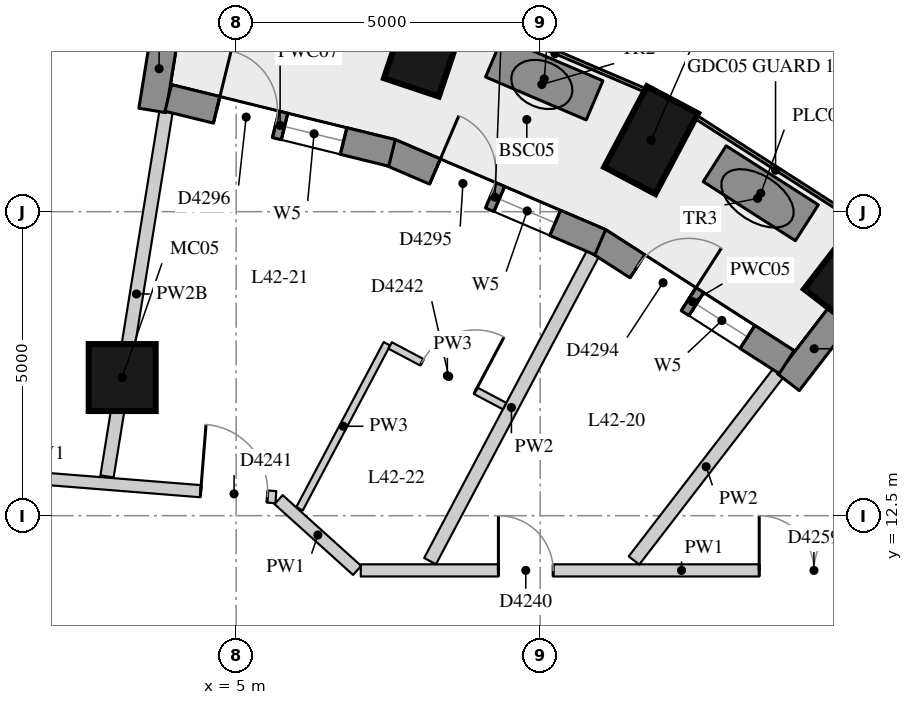
"""IFC4 building model, lengths in metres.
Left out: names, types, materials, properties, quantities, classifications, styles, units other than length and angle.
Written with IfcOpenShell. Run it as: python <this file> out.ifc"""

import sys

from ifc_helpers import new_model, si_unit, direction, frame, frame_2d, origin, origin_2d, place, context, subcontext, project, spatial, rectangle, extrude, element, fill, save


model = new_model("IFC4")
c1 = context("Model", 3, precision=1e-05, world=origin(), true_north=direction((0.0, 1.0)))
c2 = subcontext(c1, "Body", "Model", "MODEL_VIEW")
j1 = project(units=[si_unit("LENGTHUNIT", "METRE"), si_unit("PLANEANGLEUNIT", "RADIAN")], contexts=[c1])
p1 = place(None, origin())
s1 = spatial("IfcSite", under=j1, at=p1, CompositionType="ELEMENT")
p2 = place(p1, origin())
s2 = spatial("IfcBuilding", under=s1, at=p2, CompositionType="ELEMENT")
p3 = place(p2, frame((0.0, 0.0, 151.7)))
s3 = spatial("IfcBuildingStorey", under=s2, at=p3, CompositionType="ELEMENT", Elevation=151.7)
for number, where, z_axis, x_axis in (
    (1, (15.173, 16.532, 0.0), (0.0, 0.0, 1.0), (0.61, 0.792, 0.0)),
    (2, (11.825, 18.676, 0.0), (0.0, 0.0, 1.0), (0.468, 0.884, 0.0)),
    (3, (8.12, 20.256, 0.0), (0.0, 0.0, 1.0), (0.317, 0.949, 0.0)),
):
    element("IfcColumn", number, at=place(p3, frame(where, z_axis=z_axis, x_axis=x_axis)), inside=s3, PredefinedType="COLUMN", context=c2, shape_type="SweptSolid", body=[
        extrude(rectangle(XDim=1.5, YDim=0.95, at=origin_2d()), origin(), (0.0, 0.0, 1.0), 3.3),
    ])
p4 = place(p3, frame((3.126, 14.772, 0.0), z_axis=(0.0, 0.0, 1.0), x_axis=(1.0, 0.0, 0.0)))
e4 = element("IfcColumn", 4, at=p4, inside=s3, PredefinedType="COLUMN", context=c2, shape_type="SweptSolid", body=[
    extrude(rectangle(XDim=1.1, YDim=1.1, at=origin_2d()), origin(), (0.0, 0.0, 1.0), 3.3),
])
p5 = place(p3, frame((14.931, 15.797, 0.0), z_axis=(0.0, 0.0, 1.0), x_axis=(-0.609897399413, -0.792480385996, 0.0)))
e5 = element("IfcWall", 5, at=p5, inside=s3, PredefinedType="SOLIDWALL", context=c2, shape_type="SweptSolid", body=[
    extrude(rectangle(XDim=1.391, YDim=0.45, at=frame_2d((0.695, 0.0))), origin(), (0.0, 0.0, 1.0), 3.02),
])
p6 = place(p3, frame((3.844, 20.538, 0.0), z_axis=(0.0, 0.0, 1.0), x_axis=(-0.159641024018, -0.98717513312, 0.0)))
e6 = element("IfcWall", 6, at=p6, inside=s3, PredefinedType="SOLIDWALL", context=c2, shape_type="SweptSolid", body=[
    extrude(rectangle(XDim=1.39, YDim=0.45, at=frame_2d((0.695, 0.0))), origin(), (0.0, 0.0, 1.0), 2.57),
])
p7 = place(p3, frame((14.054, 15.025, 0.0), z_axis=(0.0, 0.0, 1.0), x_axis=(-0.841393801846, 0.54042249233, 0.0)))
e7 = element("IfcWall", 7, at=p7, inside=s3, PredefinedType="SOLIDWALL", context=c2, shape_type="SweptSolid", body=[
    extrude(rectangle(XDim=3.683, YDim=0.45, at=frame_2d((1.841, 0.0))), origin(), (0.0, 0.0, 1.0), 3.02),
])
p8 = place(p7, frame((0.766, 0.0, 0.4)))
e8 = element("IfcOpeningElement", 8, at=p8, cuts=e7, PredefinedType="OPENING", context=c2, shape_type="SweptSolid", body=[
    extrude(rectangle(XDim=1.0, YDim=1.75, at=frame_2d((0.5, 0.875))), frame((0.0, 0.235, 0.0), z_axis=(0.0, -1.0, 0.0), x_axis=(1.0, 0.0, 0.0)), (0.0, 0.0, 1.0), 0.47),
])
p9 = place(p7, frame((1.916, 0.0, 0.0)))
e9 = element("IfcOpeningElement", 9, at=p9, cuts=e7, PredefinedType="OPENING", context=c2, shape_type="SweptSolid", body=[
    extrude(rectangle(XDim=1.0, YDim=2.15, at=frame_2d((0.5, 1.075))), frame((0.0, 0.235, 0.0), z_axis=(0.0, -1.0, 0.0), x_axis=(1.0, 0.0, 0.0)), (0.0, 0.0, 1.0), 0.47),
])
p10 = place(p3, frame((10.988, 16.998, 0.0), z_axis=(0.0, 0.0, 1.0), x_axis=(-0.919443425894, 0.393222311907, 0.0)))
e10 = element("IfcWall", 10, at=p10, inside=s3, PredefinedType="SOLIDWALL", context=c2, shape_type="SweptSolid", body=[
    extrude(rectangle(XDim=3.763, YDim=0.45, at=frame_2d((1.882, 0.0))), origin(), (0.0, 0.0, 1.0), 3.02),
])
p11 = place(p10, frame((0.807, 0.0, 0.4)))
e11 = element("IfcOpeningElement", 11, at=p11, cuts=e10, PredefinedType="OPENING", context=c2, shape_type="SweptSolid", body=[
    extrude(rectangle(XDim=1.0, YDim=1.75, at=frame_2d((0.5, 0.875))), frame((0.0, 0.235, 0.0), z_axis=(0.0, -1.0, 0.0), x_axis=(1.0, 0.0, 0.0)), (0.0, 0.0, 1.0), 0.47),
])
p12 = place(p10, frame((1.957, 0.0, 0.0)))
e12 = element("IfcOpeningElement", 12, at=p12, cuts=e10, PredefinedType="OPENING", context=c2, shape_type="SweptSolid", body=[
    extrude(rectangle(XDim=1.0, YDim=2.15, at=frame_2d((0.5, 1.075))), frame((0.0, 0.235, 0.0), z_axis=(0.0, -1.0, 0.0), x_axis=(1.0, 0.0, 0.0)), (0.0, 0.0, 1.0), 0.47),
])
p13 = place(p3, frame((7.563, 18.466, 0.0), z_axis=(0.0, 0.0, 1.0), x_axis=(-0.97110866251, 0.238637728782, 0.0)))
e13 = element("IfcWall", 13, at=p13, inside=s3, PredefinedType="SOLIDWALL", context=c2, shape_type="SweptSolid", body=[
    extrude(rectangle(XDim=3.789, YDim=0.45, at=frame_2d((1.895, 0.0))), origin(), (0.0, 0.0, 1.0), 3.02),
])
p14 = place(p13, frame((0.82, 0.0, 0.4)))
e14 = element("IfcOpeningElement", 14, at=p14, cuts=e13, PredefinedType="OPENING", context=c2, shape_type="SweptSolid", body=[
    extrude(rectangle(XDim=1.0, YDim=1.75, at=frame_2d((0.5, 0.875))), frame((0.0, 0.235, 0.0), z_axis=(0.0, -1.0, 0.0), x_axis=(1.0, 0.0, 0.0)), (0.0, 0.0, 1.0), 0.47),
])
p15 = place(p13, frame((1.97, 0.0, 0.0)))
e15 = element("IfcOpeningElement", 15, at=p15, cuts=e13, PredefinedType="OPENING", context=c2, shape_type="SweptSolid", body=[
    extrude(rectangle(XDim=1.0, YDim=2.15, at=frame_2d((0.5, 1.075))), frame((0.0, 0.235, 0.0), z_axis=(0.0, -1.0, 0.0), x_axis=(1.0, 0.0, 0.0)), (0.0, 0.0, 1.0), 0.47),
])
p16 = place(p3, frame((14.386, 17.318, 0.0), z_axis=(0.0, 0.0, 1.0), x_axis=(-0.842032375698, 0.539426990682, 0.0)))
e16 = element("IfcWall", 16, at=p16, inside=s3, PredefinedType="USERDEFINED", context=c2, shape_type="SweptSolid", body=[
    extrude(rectangle(XDim=1.8, YDim=0.7, at=frame_2d((0.9, 0.0))), origin(), (0.0, 0.0, 1.0), 0.75),
])
p17 = place(p3, frame((10.895, 19.331, 0.0), z_axis=(0.0, 0.0, 1.0), x_axis=(-0.91978926552, 0.392412674406, 0.0)))
e17 = element("IfcWall", 17, at=p17, inside=s3, PredefinedType="USERDEFINED", context=c2, shape_type="SweptSolid", body=[
    extrude(rectangle(XDim=1.8, YDim=0.7, at=frame_2d((0.9, 0.0))), origin(), (0.0, 0.0, 1.0), 0.75),
])
p18 = place(p3, frame((-2.669, 13.468, 0.0), z_axis=(0.0, 0.0, 1.0), x_axis=(0.996831622407, -0.079540659849, 0.0)))
e18 = element("IfcWall", 18, at=p18, inside=s3, PredefinedType="PARTITIONING", context=c2, shape_type="SweptSolid", body=[
    extrude(rectangle(XDim=8.349, YDim=0.2, at=frame_2d((4.174, 0.0))), origin(), (0.0, 0.0, 1.0), 3.02),
])
p19 = place(p18, frame((7.109, 0.0, 0.0)))
e19 = element("IfcOpeningElement", 19, at=p19, cuts=e18, PredefinedType="OPENING", context=c2, shape_type="SweptSolid", body=[
    extrude(rectangle(XDim=1.1, YDim=2.1, at=frame_2d((0.55, 1.05))), frame((0.0, 0.11, 0.0), z_axis=(0.0, -1.0, 0.0), x_axis=(1.0, 0.0, 0.0)), (0.0, 0.0, 1.0), 0.22),
])
p20 = place(p18, frame((1.775, 0.0, 0.0)))
e20 = element("IfcOpeningElement", 20, at=p20, cuts=e18, PredefinedType="OPENING", context=c2, shape_type="SweptSolid", body=[
    extrude(rectangle(XDim=1.8, YDim=2.1, at=frame_2d((0.9, 1.05))), frame((0.0, 0.11, 0.0), z_axis=(0.0, -1.0, 0.0), x_axis=(1.0, 0.0, 0.0)), (0.0, 0.0, 1.0), 0.22),
])
p21 = place(p3, frame((5.698, 12.764, 0.0), z_axis=(0.0, 0.0, 1.0), x_axis=(0.742944876657, -0.669352605321, 0.0)))
e21 = element("IfcWall", 21, at=p21, inside=s3, PredefinedType="PARTITIONING", context=c2, shape_type="SweptSolid", body=[
    extrude(rectangle(XDim=1.738, YDim=0.2, at=frame_2d((0.869, 0.0))), origin(), (0.0, 0.0, 1.0), 3.02),
])
p22 = place(p3, frame((7.05, 11.6, 0.0), z_axis=(0.0, 0.0, 1.0), x_axis=(1.0, 0.0, 0.0)))
e22 = element("IfcWall", 22, at=p22, inside=s3, PredefinedType="PARTITIONING", context=c2, shape_type="SweptSolid", body=[
    extrude(rectangle(XDim=10.551, YDim=0.2, at=frame_2d((5.275, 0.0))), origin(), (0.0, 0.0, 1.0), 3.02),
])
p23 = place(p22, frame((2.264, 0.0, 0.0)))
e23 = element("IfcOpeningElement", 23, at=p23, cuts=e22, PredefinedType="OPENING", context=c2, shape_type="SweptSolid", body=[
    extrude(rectangle(XDim=0.9, YDim=2.1, at=frame_2d((0.45, 1.05))), frame((0.0, 0.11, 0.0), z_axis=(0.0, -1.0, 0.0), x_axis=(1.0, 0.0, 0.0)), (0.0, 0.0, 1.0), 0.22),
])
p24 = place(p22, frame((6.553, 0.0, 0.0)))
e24 = element("IfcOpeningElement", 24, at=p24, cuts=e22, PredefinedType="OPENING", context=c2, shape_type="SweptSolid", body=[
    extrude(rectangle(XDim=1.8, YDim=2.1, at=frame_2d((0.9, 1.05))), frame((0.0, 0.11, 0.0), z_axis=(0.0, -1.0, 0.0), x_axis=(1.0, 0.0, 0.0)), (0.0, 0.0, 1.0), 0.22),
])
p25 = place(p3, frame((13.916, 14.846, 0.0), z_axis=(0.0, 0.0, 1.0), x_axis=(-0.610023079405, -0.792383646091, 0.0)))
e25 = element("IfcWall", 25, at=p25, inside=s3, PredefinedType="PARTITIONING", context=c2, shape_type="SweptSolid", body=[
    extrude(rectangle(XDim=3.89, YDim=0.22, at=frame_2d((1.945, 0.0))), origin(), (0.0, 0.0, 1.0), 3.02),
])
p26 = place(p3, frame((10.865, 16.806, 0.0), z_axis=(0.0, 0.0, 1.0), x_axis=(-0.468046615648, -0.883703777054, 0.0)))
e26 = element("IfcWall", 26, at=p26, inside=s3, PredefinedType="PARTITIONING", context=c2, shape_type="SweptSolid", body=[
    extrude(rectangle(XDim=5.718, YDim=0.22, at=frame_2d((2.859, 0.0))), origin(), (0.0, 0.0, 1.0), 3.02),
])
p27 = place(p3, frame((3.847, 19.148, 0.0), z_axis=(0.0, 0.0, 1.0), x_axis=(-0.159656618209, -0.987172611179, 0.0)))
e27 = element("IfcWall", 27, at=p27, inside=s3, PredefinedType="PARTITIONING", context=c2, shape_type="SweptSolid", body=[
    extrude(rectangle(XDim=6.08, YDim=0.22, at=frame_2d((3.04, 0.0))), origin(), (0.0, 0.0, 1.0), 2.57),
])
p28 = place(p3, frame((6.042, 12.614, 0.0), z_axis=(0.0, 0.0, 1.0), x_axis=(0.46804844257, 0.883702809438, 0.0)))
e28 = element("IfcWall", 28, at=p28, inside=s3, PredefinedType="PARTITIONING", context=c2, shape_type="SweptSolid", body=[
    extrude(rectangle(XDim=3.071, YDim=0.12, at=frame_2d((1.535, 0.0))), origin(), (0.0, 0.0, 1.0), 3.02),
])
p29 = place(p3, frame((7.532, 15.3, 0.0), z_axis=(0.0, 0.0, 1.0), x_axis=(0.883707061275, -0.468040414764, 0.0)))
e29 = element("IfcWall", 29, at=p29, inside=s3, PredefinedType="PARTITIONING", context=c2, shape_type="SweptSolid", body=[
    extrude(rectangle(XDim=2.13, YDim=0.12, at=frame_2d((1.065, 0.0))), origin(), (0.0, 0.0, 1.0), 3.02),
])
p30 = place(p29, frame((0.59, 0.0, 0.0)))
e30 = element("IfcOpeningElement", 30, at=p30, cuts=e29, PredefinedType="OPENING", context=c2, shape_type="SweptSolid", body=[
    extrude(rectangle(XDim=1.0, YDim=2.1, at=frame_2d((0.5, 1.05))), frame((0.0, 0.07, 0.0), z_axis=(0.0, -1.0, 0.0), x_axis=(1.0, 0.0, 0.0)), (0.0, 0.0, 1.0), 0.14),
])
p31 = place(p8, origin())
e31 = element("IfcWindow", 31, at=p31, inside=s3, PartitioningType="SINGLE_PANEL", PredefinedType="WINDOW", context=c2, shape_type="SweptSolid", body=[
    extrude(rectangle(XDim=1.0, YDim=1.75, at=frame_2d((0.5, 0.875))), frame((0.0, 0.035, 0.0), z_axis=(0.0, -1.0, 0.0), x_axis=(1.0, 0.0, 0.0)), (0.0, 0.0, 1.0), 0.06),
])
fill(e8, e31)
p32 = place(p9, frame((1.0, 0.0, 0.0), z_axis=(0.0, 0.0, 1.0), x_axis=(-1.0, 0.0, 0.0)))
e32 = element("IfcDoor", 32, at=p32, inside=s3, OperationType="SINGLE_SWING_RIGHT", PredefinedType="DOOR", context=c2, shape_type="SweptSolid", body=[
    extrude(rectangle(XDim=1.0, YDim=2.15, at=frame_2d((0.5, 1.075))), frame((0.0, 0.075, 0.0), z_axis=(0.0, -1.0, 0.0), x_axis=(1.0, 0.0, 0.0)), (0.0, 0.0, 1.0), 0.05),
])
fill(e9, e32)
p33 = place(p11, origin())
e33 = element("IfcWindow", 33, at=p33, inside=s3, PartitioningType="SINGLE_PANEL", PredefinedType="WINDOW", context=c2, shape_type="SweptSolid", body=[
    extrude(rectangle(XDim=1.0, YDim=1.75, at=frame_2d((0.5, 0.875))), frame((0.0, 0.035, 0.0), z_axis=(0.0, -1.0, 0.0), x_axis=(1.0, 0.0, 0.0)), (0.0, 0.0, 1.0), 0.06),
])
fill(e11, e33)
p34 = place(p12, frame((1.0, 0.0, 0.0), z_axis=(0.0, 0.0, 1.0), x_axis=(-1.0, 0.0, 0.0)))
e34 = element("IfcDoor", 34, at=p34, inside=s3, OperationType="SINGLE_SWING_LEFT", PredefinedType="DOOR", context=c2, shape_type="SweptSolid", body=[
    extrude(rectangle(XDim=1.0, YDim=2.15, at=frame_2d((0.5, 1.075))), frame((0.0, 0.075, 0.0), z_axis=(0.0, -1.0, 0.0), x_axis=(1.0, 0.0, 0.0)), (0.0, 0.0, 1.0), 0.05),
])
fill(e12, e34)
p35 = place(p14, origin())
e35 = element("IfcWindow", 35, at=p35, inside=s3, PartitioningType="SINGLE_PANEL", PredefinedType="WINDOW", context=c2, shape_type="SweptSolid", body=[
    extrude(rectangle(XDim=1.0, YDim=1.75, at=frame_2d((0.5, 0.875))), frame((0.0, 0.035, 0.0), z_axis=(0.0, -1.0, 0.0), x_axis=(1.0, 0.0, 0.0)), (0.0, 0.0, 1.0), 0.06),
])
fill(e14, e35)
p36 = place(p15, frame((1.0, 0.0, 0.0), z_axis=(0.0, 0.0, 1.0), x_axis=(-1.0, 0.0, 0.0)))
e36 = element("IfcDoor", 36, at=p36, inside=s3, OperationType="SINGLE_SWING_LEFT", PredefinedType="DOOR", context=c2, shape_type="SweptSolid", body=[
    extrude(rectangle(XDim=1.0, YDim=2.15, at=frame_2d((0.5, 1.075))), frame((0.0, 0.075, 0.0), z_axis=(0.0, -1.0, 0.0), x_axis=(1.0, 0.0, 0.0)), (0.0, 0.0, 1.0), 0.05),
])
fill(e15, e36)
p37 = place(p23, origin())
e37 = element("IfcDoor", 37, at=p37, inside=s3, OperationType="SINGLE_SWING_LEFT", PredefinedType="DOOR", context=c2, shape_type="SweptSolid", body=[
    extrude(rectangle(XDim=0.9, YDim=2.1, at=frame_2d((0.45, 1.05))), frame((0.0, 0.025, 0.0), z_axis=(0.0, -1.0, 0.0), x_axis=(1.0, 0.0, 0.0)), (0.0, 0.0, 1.0), 0.05),
])
fill(e23, e37)
p38 = place(p19, origin())
e38 = element("IfcDoor", 38, at=p38, inside=s3, OperationType="SINGLE_SWING_LEFT", PredefinedType="DOOR", context=c2, shape_type="SweptSolid", body=[
    extrude(rectangle(XDim=1.1, YDim=2.1, at=frame_2d((0.55, 1.05))), frame((0.0, 0.025, 0.0), z_axis=(0.0, -1.0, 0.0), x_axis=(1.0, 0.0, 0.0)), (0.0, 0.0, 1.0), 0.05),
])
fill(e19, e38)
p39 = place(p30, origin())
e39 = element("IfcDoor", 39, at=p39, inside=s3, OperationType="SINGLE_SWING_RIGHT", PredefinedType="DOOR", context=c2, shape_type="SweptSolid", body=[
    extrude(rectangle(XDim=1.0, YDim=2.1, at=frame_2d((0.5, 1.05))), frame((0.0, 0.025, 0.0), z_axis=(0.0, -1.0, 0.0), x_axis=(1.0, 0.0, 0.0)), (0.0, 0.0, 1.0), 0.05),
])
fill(e30, e39)
p40 = place(p24, origin())
e40 = element("IfcDoor", 40, at=p40, inside=s3, OperationType="DOUBLE_DOOR_SINGLE_SWING", PredefinedType="DOOR", context=c2, shape_type="SweptSolid", body=[
    extrude(rectangle(XDim=1.8, YDim=2.1, at=frame_2d((0.9, 1.05))), frame((0.0, 0.025, 0.0), z_axis=(0.0, -1.0, 0.0), x_axis=(1.0, 0.0, 0.0)), (0.0, 0.0, 1.0), 0.05),
])
fill(e24, e40)
save(model, sys.argv[1])
